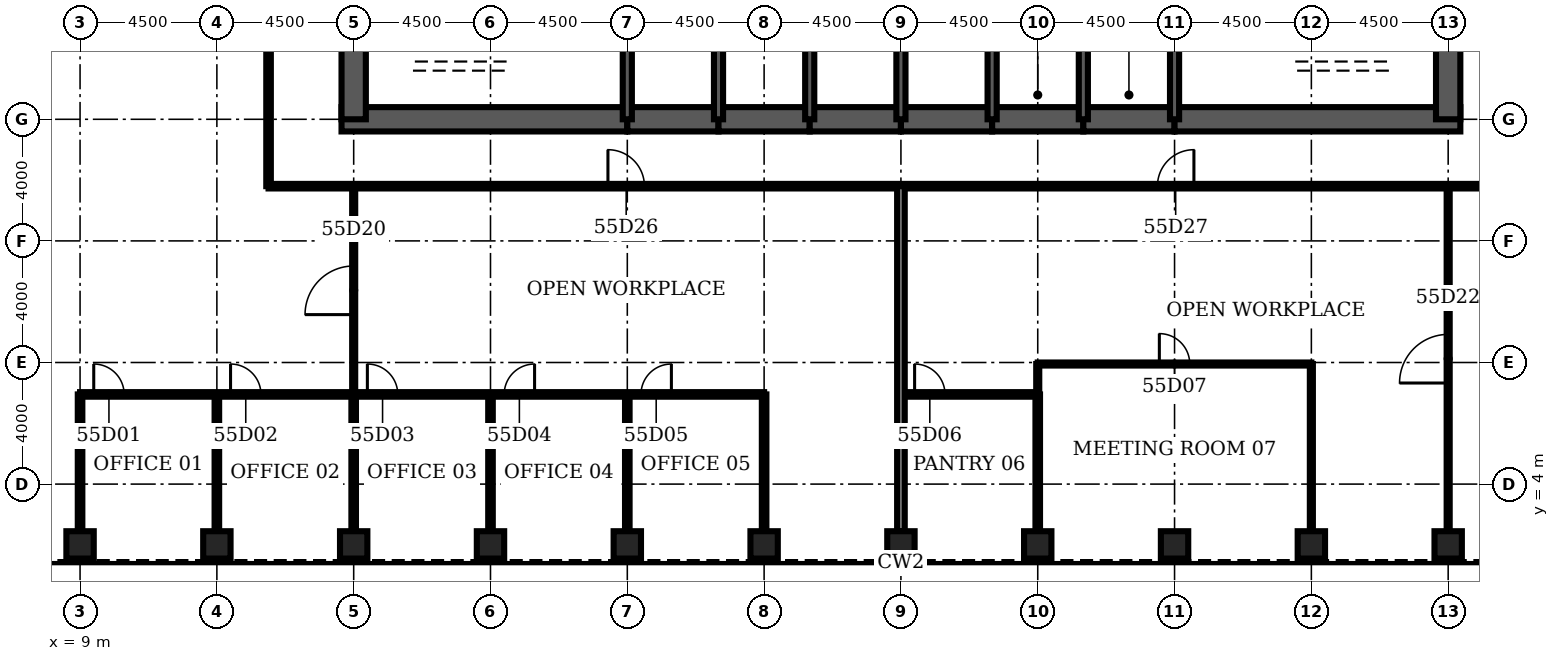
"""IFC4 building model, lengths in metres.
Left out: names, types, materials, properties, quantities, classifications, styles, units other than length and angle.
Written with IfcOpenShell. Run it as: python <this file> out.ifc"""

import sys

from ifc_helpers import new_model, si_unit, direction, frame, frame_2d, origin, origin_2d, place, context, subcontext, project, spatial, rectangle, hollow_rectangle, extrude, element, fill, save


model = new_model("IFC4")
c1 = context("Model", 3, precision=1e-05, world=origin(), true_north=direction((0.0, 1.0)))
c2 = subcontext(c1, "Body", "Model", "MODEL_VIEW")
j1 = project(units=[si_unit("LENGTHUNIT", "METRE"), si_unit("PLANEANGLEUNIT", "RADIAN")], contexts=[c1])
p1 = place(None, origin())
s1 = spatial("IfcSite", under=j1, at=p1, CompositionType="ELEMENT")
p2 = place(p1, origin())
s2 = spatial("IfcBuilding", under=s1, at=p2, CompositionType="ELEMENT")
p3 = place(p2, frame((0.0, 0.0, 244.6)))
s3 = spatial("IfcBuildingStorey", under=s2, at=p3, CompositionType="ELEMENT", Elevation=244.6)
for number, where, z_axis, x_axis in (
    (1, (9.0, 2.0, 0.0), (0.0, 0.0, 1.0), (0.0, 1.0, 0.0)),
    (2, (13.5, 2.0, 0.0), (0.0, 0.0, 1.0), (0.0, 1.0, 0.0)),
    (3, (18.0, 2.0, 0.0), (0.0, 0.0, 1.0), (0.0, 1.0, 0.0)),
    (4, (22.5, 2.0, 0.0), (0.0, 0.0, 1.0), (0.0, 1.0, 0.0)),
    (5, (27.0, 2.0, 0.0), (0.0, 0.0, 1.0), (0.0, 1.0, 0.0)),
    (6, (31.5, 2.0, 0.0), (0.0, 0.0, 1.0), (0.0, 1.0, 0.0)),
    (7, (36.0, 2.0, 0.0), (0.0, 0.0, 1.0), (0.0, 1.0, 0.0)),
    (8, (40.5, 2.0, 0.0), (0.0, 0.0, 1.0), (0.0, 1.0, 0.0)),
    (9, (45.0, 2.0, 0.0), (0.0, 0.0, 1.0), (0.0, 1.0, 0.0)),
    (10, (49.5, 2.0, 0.0), (0.0, 0.0, 1.0), (0.0, 1.0, 0.0)),
    (11, (54.0, 2.0, 0.0), (0.0, 0.0, 1.0), (0.0, 1.0, 0.0)),
):
    element("IfcColumn", number, at=place(p3, frame(where, z_axis=z_axis, x_axis=x_axis)), inside=s3, PredefinedType="COLUMN", context=c2, shape_type="SweptSolid", body=[
        extrude(hollow_rectangle(XDim=0.9, YDim=0.9, WallThickness=0.08, at=origin_2d()), origin(), (0.0, 0.0, 1.0), 4.2),
    ])
p4 = place(p3, frame((17.6, 16.0, 0.0), z_axis=(0.0, 0.0, 1.0), x_axis=(1.0, 0.0, 0.0)))
e12 = element("IfcWall", 12, at=p4, inside=s3, PredefinedType="SHEAR", context=c2, shape_type="SweptSolid", body=[
    extrude(rectangle(XDim=9.4, YDim=0.8, at=frame_2d((4.7, 0.0))), origin(), (0.0, 0.0, 1.0), 4.2),
])
for number, where, z_axis, x_axis in (
    (13, (27.0, 16.0, 0.0), (0.0, 0.0, 1.0), (1.0, 0.0, 0.0)),
    (14, (30.0, 16.0, 0.0), (0.0, 0.0, 1.0), (1.0, 0.0, 0.0)),
    (15, (33.0, 16.0, 0.0), (0.0, 0.0, 1.0), (1.0, 0.0, 0.0)),
    (16, (36.0, 16.0, 0.0), (0.0, 0.0, 1.0), (1.0, 0.0, 0.0)),
    (17, (39.0, 16.0, 0.0), (0.0, 0.0, 1.0), (1.0, 0.0, 0.0)),
    (18, (42.0, 16.0, 0.0), (0.0, 0.0, 1.0), (1.0, 0.0, 0.0)),
):
    element("IfcWall", number, at=place(p3, frame(where, z_axis=z_axis, x_axis=x_axis)), inside=s3, PredefinedType="SHEAR", context=c2, shape_type="SweptSolid", body=[
        extrude(rectangle(XDim=3.0, YDim=0.8, at=frame_2d((1.5, 0.0))), origin(), (0.0, 0.0, 1.0), 4.2),
    ])
p5 = place(p3, frame((45.0, 16.0, 0.0), z_axis=(0.0, 0.0, 1.0), x_axis=(1.0, 0.0, 0.0)))
e19 = element("IfcWall", 19, at=p5, inside=s3, PredefinedType="SHEAR", context=c2, shape_type="SweptSolid", body=[
    extrude(rectangle(XDim=9.4, YDim=0.8, at=frame_2d((4.7, 0.0))), origin(), (0.0, 0.0, 1.0), 4.2),
])
for number, where, z_axis, x_axis in (
    (20, (18.0, 19.2, 0.0), (0.0, 0.0, 1.0), (0.0, -1.0, 0.0)),
    (21, (54.0, 16.0, 0.0), (0.0, 0.0, 1.0), (0.0, 1.0, 0.0)),
):
    element("IfcWall", number, at=place(p3, frame(where, z_axis=z_axis, x_axis=x_axis)), inside=s3, PredefinedType="SHEAR", context=c2, shape_type="SweptSolid", body=[
        extrude(rectangle(XDim=3.2, YDim=0.8, at=frame_2d((1.6, 0.0))), origin(), (0.0, 0.0, 1.0), 4.2),
    ])
for number, where, z_axis, x_axis in (
    (22, (27.0, 16.0, 0.0), (0.0, 0.0, 1.0), (0.0, 1.0, 0.0)),
    (23, (30.0, 16.0, 0.0), (0.0, 0.0, 1.0), (0.0, 1.0, 0.0)),
    (24, (33.0, 16.0, 0.0), (0.0, 0.0, 1.0), (0.0, 1.0, 0.0)),
    (25, (36.0, 16.0, 0.0), (0.0, 0.0, 1.0), (0.0, 1.0, 0.0)),
    (26, (39.0, 16.0, 0.0), (0.0, 0.0, 1.0), (0.0, 1.0, 0.0)),
    (27, (42.0, 16.0, 0.0), (0.0, 0.0, 1.0), (0.0, 1.0, 0.0)),
    (28, (45.0, 16.0, 0.0), (0.0, 0.0, 1.0), (0.0, 1.0, 0.0)),
):
    element("IfcWall", number, at=place(p3, frame(where, z_axis=z_axis, x_axis=x_axis)), inside=s3, PredefinedType="SOLIDWALL", context=c2, shape_type="SweptSolid", body=[
        extrude(rectangle(XDim=3.2, YDim=0.3, at=frame_2d((1.6, 0.0))), origin(), (0.0, 0.0, 1.0), 4.2),
    ])
p6 = place(p3, frame((39.15, 17.35, 0.0), z_axis=(0.0, 0.0, 1.0), x_axis=(1.0, 0.0, 0.0)))
e29 = element("IfcWall", 29, at=p6, inside=s3, PredefinedType="SOLIDWALL", context=c2, shape_type="SweptSolid", body=[
    extrude(rectangle(XDim=2.7, YDim=0.3, at=frame_2d((1.35, 0.0))), origin(), (0.0, 0.0, 1.0), 4.04),
])
p7 = place(p6, frame((0.85, 0.0, 0.0)))
e30 = element("IfcOpeningElement", 30, at=p7, cuts=e29, PredefinedType="OPENING", context=c2, shape_type="SweptSolid", body=[
    extrude(rectangle(XDim=1.0, YDim=2.1, at=frame_2d((0.5, 1.05))), frame((0.0, 0.16, 0.0), z_axis=(0.0, -1.0, 0.0), x_axis=(1.0, 0.0, 0.0)), (0.0, 0.0, 1.0), 0.32),
])
p8 = place(p3, frame((42.15, 17.35, 0.0), z_axis=(0.0, 0.0, 1.0), x_axis=(1.0, 0.0, 0.0)))
e31 = element("IfcWall", 31, at=p8, inside=s3, PredefinedType="SOLIDWALL", context=c2, shape_type="SweptSolid", body=[
    extrude(rectangle(XDim=2.7, YDim=0.3, at=frame_2d((1.35, 0.0))), origin(), (0.0, 0.0, 1.0), 4.04),
])
p9 = place(p8, frame((0.85, 0.0, 0.0)))
e32 = element("IfcOpeningElement", 32, at=p9, cuts=e31, PredefinedType="OPENING", context=c2, shape_type="SweptSolid", body=[
    extrude(rectangle(XDim=1.0, YDim=2.1, at=frame_2d((0.5, 1.05))), frame((0.0, 0.16, 0.0), z_axis=(0.0, -1.0, 0.0), x_axis=(1.0, 0.0, 0.0)), (0.0, 0.0, 1.0), 0.32),
])
p10 = place(p3, frame((9.0, 6.95, 0.0), z_axis=(0.0, 0.0, 1.0), x_axis=(1.0, 0.0, 0.0)))
e33 = element("IfcWall", 33, at=p10, inside=s3, PredefinedType="PARTITIONING", context=c2, shape_type="SweptSolid", body=[
    extrude(rectangle(XDim=22.5, YDim=0.15, at=frame_2d((11.25, 0.0))), origin(), (0.0, 0.0, 1.0), 3.0),
])
p11 = place(p10, frame((0.45, 0.0, 0.0)))
e34 = element("IfcOpeningElement", 34, at=p11, cuts=e33, PredefinedType="OPENING", context=c2, shape_type="SweptSolid", body=[
    extrude(rectangle(XDim=1.0, YDim=2.1, at=frame_2d((0.5, 1.05))), frame((0.0, 0.085, 0.0), z_axis=(0.0, -1.0, 0.0), x_axis=(1.0, 0.0, 0.0)), (0.0, 0.0, 1.0), 0.17),
])
p12 = place(p10, frame((4.95, 0.0, 0.0)))
e35 = element("IfcOpeningElement", 35, at=p12, cuts=e33, PredefinedType="OPENING", context=c2, shape_type="SweptSolid", body=[
    extrude(rectangle(XDim=1.0, YDim=2.1, at=frame_2d((0.5, 1.05))), frame((0.0, 0.085, 0.0), z_axis=(0.0, -1.0, 0.0), x_axis=(1.0, 0.0, 0.0)), (0.0, 0.0, 1.0), 0.17),
])
p13 = place(p10, frame((9.45, 0.0, 0.0)))
e36 = element("IfcOpeningElement", 36, at=p13, cuts=e33, PredefinedType="OPENING", context=c2, shape_type="SweptSolid", body=[
    extrude(rectangle(XDim=1.0, YDim=2.1, at=frame_2d((0.5, 1.05))), frame((0.0, 0.085, 0.0), z_axis=(0.0, -1.0, 0.0), x_axis=(1.0, 0.0, 0.0)), (0.0, 0.0, 1.0), 0.17),
])
p14 = place(p10, frame((13.95, 0.0, 0.0)))
e37 = element("IfcOpeningElement", 37, at=p14, cuts=e33, PredefinedType="OPENING", context=c2, shape_type="SweptSolid", body=[
    extrude(rectangle(XDim=1.0, YDim=2.1, at=frame_2d((0.5, 1.05))), frame((0.0, 0.085, 0.0), z_axis=(0.0, -1.0, 0.0), x_axis=(1.0, 0.0, 0.0)), (0.0, 0.0, 1.0), 0.17),
])
p15 = place(p10, frame((18.45, 0.0, 0.0)))
e38 = element("IfcOpeningElement", 38, at=p15, cuts=e33, PredefinedType="OPENING", context=c2, shape_type="SweptSolid", body=[
    extrude(rectangle(XDim=1.0, YDim=2.1, at=frame_2d((0.5, 1.05))), frame((0.0, 0.085, 0.0), z_axis=(0.0, -1.0, 0.0), x_axis=(1.0, 0.0, 0.0)), (0.0, 0.0, 1.0), 0.17),
])
p16 = place(p3, frame((36.0, 6.95, 0.0), z_axis=(0.0, 0.0, 1.0), x_axis=(1.0, 0.0, 0.0)))
e39 = element("IfcWall", 39, at=p16, inside=s3, PredefinedType="PARTITIONING", context=c2, shape_type="SweptSolid", body=[
    extrude(rectangle(XDim=4.5, YDim=0.15, at=frame_2d((2.25, 0.0))), origin(), (0.0, 0.0, 1.0), 3.0),
])
p17 = place(p16, frame((0.45, 0.0, 0.0)))
e40 = element("IfcOpeningElement", 40, at=p17, cuts=e39, PredefinedType="OPENING", context=c2, shape_type="SweptSolid", body=[
    extrude(rectangle(XDim=1.0, YDim=2.1, at=frame_2d((0.5, 1.05))), frame((0.0, 0.085, 0.0), z_axis=(0.0, -1.0, 0.0), x_axis=(1.0, 0.0, 0.0)), (0.0, 0.0, 1.0), 0.17),
])
p18 = place(p3, frame((40.5, 7.95, 0.0), z_axis=(0.0, 0.0, 1.0), x_axis=(1.0, 0.0, 0.0)))
e41 = element("IfcWall", 41, at=p18, inside=s3, PredefinedType="PARTITIONING", context=c2, shape_type="SweptSolid", body=[
    extrude(rectangle(XDim=9.0, YDim=0.1, at=frame_2d((4.5, 0.0))), origin(), (0.0, 0.0, 1.0), 3.0),
])
p19 = place(p18, frame((4.0, 0.0, 0.0)))
e42 = element("IfcOpeningElement", 42, at=p19, cuts=e41, PredefinedType="OPENING", context=c2, shape_type="SweptSolid", body=[
    extrude(rectangle(XDim=1.0, YDim=2.1, at=frame_2d((0.5, 1.05))), frame((0.0, 0.06, 0.0), z_axis=(0.0, -1.0, 0.0), x_axis=(1.0, 0.0, 0.0)), (0.0, 0.0, 1.0), 0.12),
])
p20 = place(p3, frame((15.2, 13.8, 0.0), z_axis=(0.0, 0.0, 1.0), x_axis=(1.0, 0.0, 0.0)))
e43 = element("IfcWall", 43, at=p20, inside=s3, PredefinedType="PARTITIONING", context=c2, shape_type="SweptSolid", body=[
    extrude(rectangle(XDim=41.6, YDim=0.15, at=frame_2d((20.8, 0.0))), origin(), (0.0, 0.0, 1.0), 3.0),
])
p21 = place(p20, frame((11.163, 0.0, 0.0)))
e44 = element("IfcOpeningElement", 44, at=p21, cuts=e43, PredefinedType="OPENING", context=c2, shape_type="SweptSolid", body=[
    extrude(rectangle(XDim=1.2, YDim=2.1, at=frame_2d((0.6, 1.05))), frame((0.0, 0.085, 0.0), z_axis=(0.0, -1.0, 0.0), x_axis=(1.0, 0.0, 0.0)), (0.0, 0.0, 1.0), 0.17),
])
p22 = place(p20, frame((29.237, 0.0, 0.0)))
e45 = element("IfcOpeningElement", 45, at=p22, cuts=e43, PredefinedType="OPENING", context=c2, shape_type="SweptSolid", body=[
    extrude(rectangle(XDim=1.2, YDim=2.1, at=frame_2d((0.6, 1.05))), frame((0.0, 0.085, 0.0), z_axis=(0.0, -1.0, 0.0), x_axis=(1.0, 0.0, 0.0)), (0.0, 0.0, 1.0), 0.17),
])
for number, where, z_axis, x_axis in (
    (46, (9.0, 2.45, 0.0), (0.0, 0.0, 1.0), (0.0, 1.0, 0.0)),
    (47, (13.5, 2.45, 0.0), (0.0, 0.0, 1.0), (0.0, 1.0, 0.0)),
):
    element("IfcWall", number, at=place(p3, frame(where, z_axis=z_axis, x_axis=x_axis)), inside=s3, PredefinedType="PARTITIONING", context=c2, shape_type="SweptSolid", body=[
        extrude(rectangle(XDim=4.5, YDim=0.15, at=frame_2d((2.25, 0.0))), origin(), (0.0, 0.0, 1.0), 3.0),
    ])
p23 = place(p3, frame((15.2, 13.8, 0.0), z_axis=(0.0, 0.0, 1.0), x_axis=(0.0, 1.0, 0.0)))
e48 = element("IfcWall", 48, at=p23, inside=s3, PredefinedType="PARTITIONING", context=c2, shape_type="SweptSolid", body=[
    extrude(rectangle(XDim=18.6, YDim=0.15, at=frame_2d((9.3, 0.0))), origin(), (0.0, 0.0, 1.0), 3.0),
])
p24 = place(p23, frame((8.7, 0.0, 0.0)))
e49 = element("IfcOpeningElement", 49, at=p24, cuts=e48, PredefinedType="OPENING", context=c2, shape_type="SweptSolid", body=[
    extrude(rectangle(XDim=1.2, YDim=2.1, at=frame_2d((0.6, 1.05))), frame((0.0, 0.085, 0.0), z_axis=(0.0, -1.0, 0.0), x_axis=(1.0, 0.0, 0.0)), (0.0, 0.0, 1.0), 0.17),
])
p25 = place(p3, frame((18.0, 2.45, 0.0), z_axis=(0.0, 0.0, 1.0), x_axis=(0.0, 1.0, 0.0)))
e50 = element("IfcWall", 50, at=p25, inside=s3, PredefinedType="PARTITIONING", context=c2, shape_type="SweptSolid", body=[
    extrude(rectangle(XDim=4.5, YDim=0.15, at=frame_2d((2.25, 0.0))), origin(), (0.0, 0.0, 1.0), 3.0),
])
p26 = place(p3, frame((18.0, 6.95, 0.0), z_axis=(0.0, 0.0, 1.0), x_axis=(0.0, 1.0, 0.0)))
e51 = element("IfcWall", 51, at=p26, inside=s3, PredefinedType="PARTITIONING", context=c2, shape_type="SweptSolid", body=[
    extrude(rectangle(XDim=6.85, YDim=0.1, at=frame_2d((3.425, 0.0))), origin(), (0.0, 0.0, 1.0), 3.0),
])
p27 = place(p26, frame((2.625, 0.0, 0.0)))
e52 = element("IfcOpeningElement", 52, at=p27, cuts=e51, PredefinedType="OPENING", context=c2, shape_type="SweptSolid", body=[
    extrude(rectangle(XDim=1.6, YDim=2.1, at=frame_2d((0.8, 1.05))), frame((0.0, 0.06, 0.0), z_axis=(0.0, -1.0, 0.0), x_axis=(1.0, 0.0, 0.0)), (0.0, 0.0, 1.0), 0.12),
])
for number, where, z_axis, x_axis in (
    (53, (22.5, 2.45, 0.0), (0.0, 0.0, 1.0), (0.0, 1.0, 0.0)),
    (54, (27.0, 2.45, 0.0), (0.0, 0.0, 1.0), (0.0, 1.0, 0.0)),
    (55, (31.5, 2.45, 0.0), (0.0, 0.0, 1.0), (0.0, 1.0, 0.0)),
):
    element("IfcWall", number, at=place(p3, frame(where, z_axis=z_axis, x_axis=x_axis)), inside=s3, PredefinedType="PARTITIONING", context=c2, shape_type="SweptSolid", body=[
        extrude(rectangle(XDim=4.5, YDim=0.15, at=frame_2d((2.25, 0.0))), origin(), (0.0, 0.0, 1.0), 3.0),
    ])
p28 = place(p3, frame((36.0, 2.45, 0.0), z_axis=(0.0, 0.0, 1.0), x_axis=(0.0, 1.0, 0.0)))
e56 = element("IfcWall", 56, at=p28, inside=s3, PredefinedType="PARTITIONING", context=c2, shape_type="SweptSolid", body=[
    extrude(rectangle(XDim=11.35, YDim=0.25, at=frame_2d((5.675, 0.0))), origin(), (0.0, 0.0, 1.0), 3.0),
])
p29 = place(p3, frame((40.5, 2.45, 0.0), z_axis=(0.0, 0.0, 1.0), x_axis=(0.0, 1.0, 0.0)))
e57 = element("IfcWall", 57, at=p29, inside=s3, PredefinedType="PARTITIONING", context=c2, shape_type="SweptSolid", body=[
    extrude(rectangle(XDim=4.5, YDim=0.15, at=frame_2d((2.25, 0.0))), origin(), (0.0, 0.0, 1.0), 3.0),
])
p30 = place(p3, frame((40.5, 6.95, 0.0), z_axis=(0.0, 0.0, 1.0), x_axis=(0.0, 1.0, 0.0)))
e58 = element("IfcWall", 58, at=p30, inside=s3, PredefinedType="PARTITIONING", context=c2, shape_type="SweptSolid", body=[
    extrude(rectangle(XDim=1.0, YDim=0.1, at=frame_2d((0.5, 0.0))), origin(), (0.0, 0.0, 1.0), 3.0),
])
p31 = place(p3, frame((49.5, 2.45, 0.0), z_axis=(0.0, 0.0, 1.0), x_axis=(0.0, 1.0, 0.0)))
e59 = element("IfcWall", 59, at=p31, inside=s3, PredefinedType="PARTITIONING", context=c2, shape_type="SweptSolid", body=[
    extrude(rectangle(XDim=5.5, YDim=0.1, at=frame_2d((2.75, 0.0))), origin(), (0.0, 0.0, 1.0), 3.0),
])
p32 = place(p3, frame((54.0, 2.45, 0.0), z_axis=(0.0, 0.0, 1.0), x_axis=(0.0, 1.0, 0.0)))
e60 = element("IfcWall", 60, at=p32, inside=s3, PredefinedType="PARTITIONING", context=c2, shape_type="SweptSolid", body=[
    extrude(rectangle(XDim=11.35, YDim=0.1, at=frame_2d((5.675, 0.0))), origin(), (0.0, 0.0, 1.0), 3.0),
])
p33 = place(p32, frame((4.875, 0.0, 0.0)))
e61 = element("IfcOpeningElement", 61, at=p33, cuts=e60, PredefinedType="OPENING", context=c2, shape_type="SweptSolid", body=[
    extrude(rectangle(XDim=1.6, YDim=2.1, at=frame_2d((0.8, 1.05))), frame((0.0, 0.06, 0.0), z_axis=(0.0, -1.0, 0.0), x_axis=(1.0, 0.0, 0.0)), (0.0, 0.0, 1.0), 0.12),
])
p34 = place(p7, origin())
e62 = element("IfcDoor", 62, at=p34, inside=s3, OperationType="SINGLE_SWING_LEFT", PredefinedType="DOOR", context=c2, shape_type="SweptSolid", body=[
    extrude(rectangle(XDim=1.0, YDim=2.1, at=frame_2d((0.5, 1.05))), frame((0.0, 0.025, 0.0), z_axis=(0.0, -1.0, 0.0), x_axis=(1.0, 0.0, 0.0)), (0.0, 0.0, 1.0), 0.05),
])
fill(e30, e62)
p35 = place(p9, origin())
e63 = element("IfcDoor", 63, at=p35, inside=s3, OperationType="SINGLE_SWING_LEFT", PredefinedType="DOOR", context=c2, shape_type="SweptSolid", body=[
    extrude(rectangle(XDim=1.0, YDim=2.1, at=frame_2d((0.5, 1.05))), frame((0.0, 0.025, 0.0), z_axis=(0.0, -1.0, 0.0), x_axis=(1.0, 0.0, 0.0)), (0.0, 0.0, 1.0), 0.05),
])
fill(e32, e63)
p36 = place(p11, origin())
e64 = element("IfcDoor", 64, at=p36, inside=s3, OperationType="SINGLE_SWING_LEFT", PredefinedType="DOOR", context=c2, shape_type="SweptSolid", body=[
    extrude(rectangle(XDim=1.0, YDim=2.1, at=frame_2d((0.5, 1.05))), frame((0.0, 0.025, 0.0), z_axis=(0.0, -1.0, 0.0), x_axis=(1.0, 0.0, 0.0)), (0.0, 0.0, 1.0), 0.05),
])
fill(e34, e64)
p37 = place(p12, origin())
e65 = element("IfcDoor", 65, at=p37, inside=s3, OperationType="SINGLE_SWING_LEFT", PredefinedType="DOOR", context=c2, shape_type="SweptSolid", body=[
    extrude(rectangle(XDim=1.0, YDim=2.1, at=frame_2d((0.5, 1.05))), frame((0.0, 0.025, 0.0), z_axis=(0.0, -1.0, 0.0), x_axis=(1.0, 0.0, 0.0)), (0.0, 0.0, 1.0), 0.05),
])
fill(e35, e65)
p38 = place(p13, origin())
e66 = element("IfcDoor", 66, at=p38, inside=s3, OperationType="SINGLE_SWING_LEFT", PredefinedType="DOOR", context=c2, shape_type="SweptSolid", body=[
    extrude(rectangle(XDim=1.0, YDim=2.1, at=frame_2d((0.5, 1.05))), frame((0.0, 0.025, 0.0), z_axis=(0.0, -1.0, 0.0), x_axis=(1.0, 0.0, 0.0)), (0.0, 0.0, 1.0), 0.05),
])
fill(e36, e66)
p39 = place(p14, origin())
e67 = element("IfcDoor", 67, at=p39, inside=s3, OperationType="SINGLE_SWING_RIGHT", PredefinedType="DOOR", context=c2, shape_type="SweptSolid", body=[
    extrude(rectangle(XDim=1.0, YDim=2.1, at=frame_2d((0.5, 1.05))), frame((0.0, 0.025, 0.0), z_axis=(0.0, -1.0, 0.0), x_axis=(1.0, 0.0, 0.0)), (0.0, 0.0, 1.0), 0.05),
])
fill(e37, e67)
p40 = place(p15, origin())
e68 = element("IfcDoor", 68, at=p40, inside=s3, OperationType="SINGLE_SWING_RIGHT", PredefinedType="DOOR", context=c2, shape_type="SweptSolid", body=[
    extrude(rectangle(XDim=1.0, YDim=2.1, at=frame_2d((0.5, 1.05))), frame((0.0, 0.025, 0.0), z_axis=(0.0, -1.0, 0.0), x_axis=(1.0, 0.0, 0.0)), (0.0, 0.0, 1.0), 0.05),
])
fill(e38, e68)
p41 = place(p17, origin())
e69 = element("IfcDoor", 69, at=p41, inside=s3, OperationType="SINGLE_SWING_LEFT", PredefinedType="DOOR", context=c2, shape_type="SweptSolid", body=[
    extrude(rectangle(XDim=1.0, YDim=2.1, at=frame_2d((0.5, 1.05))), frame((0.0, 0.025, 0.0), z_axis=(0.0, -1.0, 0.0), x_axis=(1.0, 0.0, 0.0)), (0.0, 0.0, 1.0), 0.05),
])
fill(e40, e69)
p42 = place(p19, origin())
e70 = element("IfcDoor", 70, at=p42, inside=s3, OperationType="SINGLE_SWING_LEFT", PredefinedType="DOOR", context=c2, shape_type="SweptSolid", body=[
    extrude(rectangle(XDim=1.0, YDim=2.1, at=frame_2d((0.5, 1.05))), frame((0.0, 0.025, 0.0), z_axis=(0.0, -1.0, 0.0), x_axis=(1.0, 0.0, 0.0)), (0.0, 0.0, 1.0), 0.05),
])
fill(e42, e70)
p43 = place(p27, origin())
e71 = element("IfcDoor", 71, at=p43, inside=s3, OperationType="SINGLE_SWING_LEFT", PredefinedType="DOOR", context=c2, shape_type="SweptSolid", body=[
    extrude(rectangle(XDim=1.6, YDim=2.1, at=frame_2d((0.8, 1.05))), frame((0.0, 0.025, 0.0), z_axis=(0.0, -1.0, 0.0), x_axis=(1.0, 0.0, 0.0)), (0.0, 0.0, 1.0), 0.05),
])
fill(e52, e71)
p44 = place(p33, origin())
e72 = element("IfcDoor", 72, at=p44, inside=s3, OperationType="SINGLE_SWING_LEFT", PredefinedType="DOOR", context=c2, shape_type="SweptSolid", body=[
    extrude(rectangle(XDim=1.6, YDim=2.1, at=frame_2d((0.8, 1.05))), frame((0.0, 0.025, 0.0), z_axis=(0.0, -1.0, 0.0), x_axis=(1.0, 0.0, 0.0)), (0.0, 0.0, 1.0), 0.05),
])
fill(e61, e72)
p45 = place(p21, origin())
e73 = element("IfcDoor", 73, at=p45, inside=s3, OperationType="SINGLE_SWING_LEFT", PredefinedType="DOOR", context=c2, shape_type="SweptSolid", body=[
    extrude(rectangle(XDim=1.2, YDim=2.1, at=frame_2d((0.6, 1.05))), frame((0.0, 0.025, 0.0), z_axis=(0.0, -1.0, 0.0), x_axis=(1.0, 0.0, 0.0)), (0.0, 0.0, 1.0), 0.05),
])
fill(e44, e73)
p46 = place(p22, origin())
e74 = element("IfcDoor", 74, at=p46, inside=s3, OperationType="SINGLE_SWING_RIGHT", PredefinedType="DOOR", context=c2, shape_type="SweptSolid", body=[
    extrude(rectangle(XDim=1.2, YDim=2.1, at=frame_2d((0.6, 1.05))), frame((0.0, 0.025, 0.0), z_axis=(0.0, -1.0, 0.0), x_axis=(1.0, 0.0, 0.0)), (0.0, 0.0, 1.0), 0.05),
])
fill(e45, e74)
save(model, sys.argv[1])
